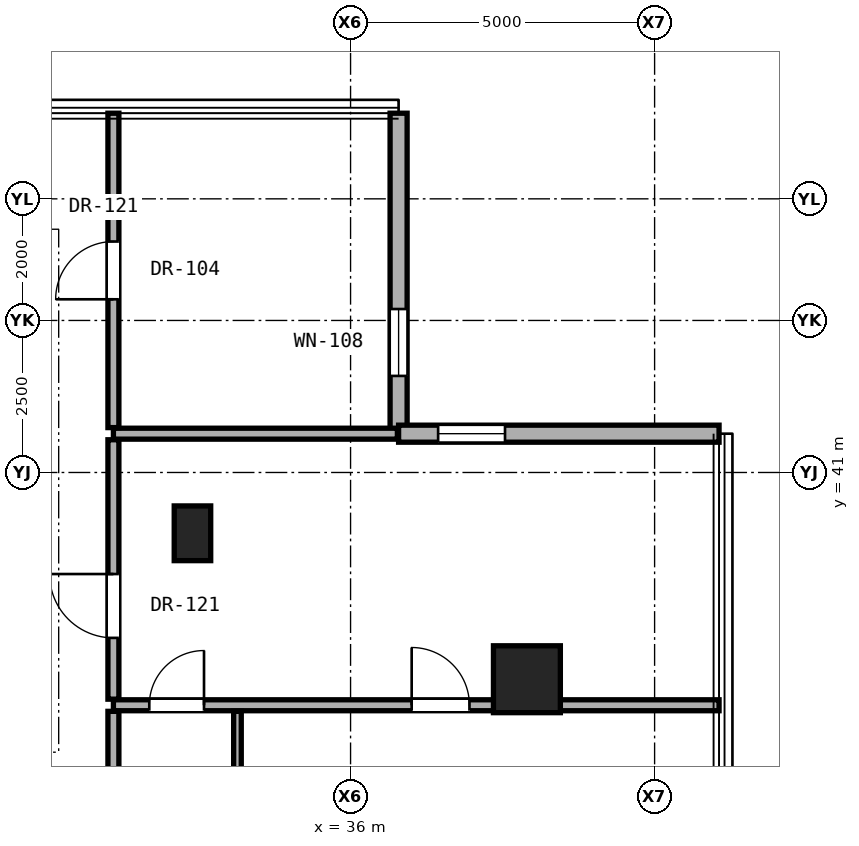
"""IFC4 building model, lengths in metres.
Left out: names, types, materials, properties, quantities, classifications, styles, units other than length and angle.
Written with IfcOpenShell. Run it as: python <this file> out.ifc"""

import sys

from ifc_helpers import new_model, si_unit, direction, frame, frame_2d, origin, origin_2d, place, context, subcontext, project, spatial, rectangle, hollow_rectangle, extrude, element, fill, save


model = new_model("IFC4")
c1 = context("Model", 3, precision=1e-05, world=origin(), true_north=direction((0.0, 1.0)))
c2 = subcontext(c1, "Body", "Model", "MODEL_VIEW")
j1 = project(units=[si_unit("LENGTHUNIT", "METRE"), si_unit("PLANEANGLEUNIT", "RADIAN")], contexts=[c1])
p1 = place(None, origin())
s1 = spatial("IfcSite", under=j1, at=p1, CompositionType="ELEMENT")
p2 = place(p1, origin())
s2 = spatial("IfcBuilding", under=s1, at=p2, CompositionType="ELEMENT")
p3 = place(p2, frame((0.0, 0.0, 137.9)))
s3 = spatial("IfcBuildingStorey", under=s2, at=p3, CompositionType="ELEMENT", Elevation=137.9)
p4 = place(p3, frame((38.9, 37.6, 0.0), z_axis=(0.0, 0.0, 1.0), x_axis=(1.0, 0.0, 0.0)))
e1 = element("IfcColumn", 1, at=p4, inside=s3, PredefinedType="COLUMN", context=c2, shape_type="SweptSolid", body=[
    extrude(hollow_rectangle(XDim=1.1, YDim=1.1, WallThickness=0.06, at=origin_2d()), origin(), (0.0, 0.0, 1.0), 3.3),
])
p5 = place(p3, frame((33.4, 40.0, 0.0), z_axis=(0.0, 0.0, 1.0), x_axis=(1.0, 0.0, 0.0)))
e2 = element("IfcColumn", 2, at=p5, inside=s3, PredefinedType="PILASTER", context=c2, shape_type="SweptSolid", body=[
    extrude(rectangle(XDim=0.6, YDim=0.9, at=origin_2d()), origin(), (0.0, 0.0, 1.0), 3.3),
])
p6 = place(p3, frame((36.79, 41.638, 0.0), z_axis=(0.0, 0.0, 1.0), x_axis=(0.0, 1.0, 0.0)))
e3 = element("IfcWall", 3, at=p6, inside=s3, PredefinedType="SOLIDWALL", context=c2, shape_type="SweptSolid", body=[
    extrude(rectangle(XDim=5.27, YDim=0.28, at=frame_2d((2.635, 0.0))), origin(), (0.0, 0.0, 1.0), 3.06),
])
p7 = place(p6, frame((0.95, 0.0, 0.85)))
e4 = element("IfcOpeningElement", 4, at=p7, cuts=e3, PredefinedType="OPENING", context=c2, shape_type="SweptSolid", body=[
    extrude(rectangle(XDim=1.1, YDim=2.0, at=frame_2d((0.55, 1.0))), frame((0.0, 0.15, 0.0), z_axis=(0.0, -1.0, 0.0), x_axis=(1.0, 0.0, 0.0)), (0.0, 0.0, 1.0), 0.3),
])
p8 = place(p3, frame((42.06, 41.638, 0.0), z_axis=(0.0, 0.0, 1.0), x_axis=(-1.0, 0.0, 0.0)))
e5 = element("IfcWall", 5, at=p8, inside=s3, PredefinedType="SOLIDWALL", context=c2, shape_type="SweptSolid", body=[
    extrude(rectangle(XDim=5.27, YDim=0.28, at=frame_2d((2.635, 0.0))), origin(), (0.0, 0.0, 1.0), 3.06),
])
p9 = place(p8, frame((3.52, 0.0, 0.85)))
e6 = element("IfcOpeningElement", 6, at=p9, cuts=e5, PredefinedType="OPENING", context=c2, shape_type="SweptSolid", body=[
    extrude(rectangle(XDim=1.1, YDim=2.0, at=frame_2d((0.55, 1.0))), frame((0.0, 0.15, 0.0), z_axis=(0.0, -1.0, 0.0), x_axis=(1.0, 0.0, 0.0)), (0.0, 0.0, 1.0), 0.3),
])
p10 = place(p3, frame((32.1, 37.172, 0.0), z_axis=(0.0, 0.0, 1.0), x_axis=(1.0, 0.0, 0.0)))
e7 = element("IfcWall", 7, at=p10, inside=s3, PredefinedType="PARTITIONING", context=c2, shape_type="SweptSolid", body=[
    extrude(rectangle(XDim=9.96, YDim=0.18, at=frame_2d((4.98, 0.0))), origin(), (0.0, 0.0, 1.0), 2.299),
])
p11 = place(p10, frame((4.905, 0.0, 0.0)))
e8 = element("IfcOpeningElement", 8, at=p11, cuts=e7, PredefinedType="OPENING", context=c2, shape_type="SweptSolid", body=[
    extrude(rectangle(XDim=0.95, YDim=2.15, at=frame_2d((0.475, 1.075))), frame((0.0, 0.1, 0.0), z_axis=(0.0, -1.0, 0.0), x_axis=(1.0, 0.0, 0.0)), (0.0, 0.0, 1.0), 0.2),
])
p12 = place(p10, frame((0.59, 0.0, 0.0)))
e9 = element("IfcOpeningElement", 9, at=p12, cuts=e7, PredefinedType="OPENING", context=c2, shape_type="SweptSolid", body=[
    extrude(rectangle(XDim=0.9, YDim=2.1, at=frame_2d((0.45, 1.05))), frame((0.0, 0.1, 0.0), z_axis=(0.0, -1.0, 0.0), x_axis=(1.0, 0.0, 0.0)), (0.0, 0.0, 1.0), 0.2),
])
p13 = place(p3, frame((32.1, 41.638, 0.0), z_axis=(0.0, 0.0, 1.0), x_axis=(1.0, 0.0, 0.0)))
e10 = element("IfcWall", 10, at=p13, inside=s3, PredefinedType="PARTITIONING", context=c2, shape_type="SweptSolid", body=[
    extrude(rectangle(XDim=4.67, YDim=0.18, at=frame_2d((2.335, 0.0))), origin(), (0.0, 0.0, 1.0), 3.08),
])
p14 = place(p3, frame((32.1, 34.524, 0.0), z_axis=(0.0, 0.0, 1.0), x_axis=(0.0, 1.0, 0.0)))
e11 = element("IfcWall", 11, at=p14, inside=s3, PredefinedType="PARTITIONING", context=c2, shape_type="SweptSolid", body=[
    extrude(rectangle(XDim=2.548, YDim=0.18, at=frame_2d((1.274, 0.0))), origin(), (0.0, 0.0, 1.0), 3.08),
])
p15 = place(p3, frame((32.1, 37.272, 0.0), z_axis=(0.0, 0.0, 1.0), x_axis=(0.0, 1.0, 0.0)))
e12 = element("IfcWall", 12, at=p15, inside=s3, PredefinedType="PARTITIONING", context=c2, shape_type="SweptSolid", body=[
    extrude(rectangle(XDim=4.266, YDim=0.18, at=frame_2d((2.133, 0.0))), origin(), (0.0, 0.0, 1.0), 2.456),
])
p16 = place(p15, frame((1.008, 0.0, 0.0)))
e13 = element("IfcOpeningElement", 13, at=p16, cuts=e12, PredefinedType="OPENING", context=c2, shape_type="SweptSolid", body=[
    extrude(rectangle(XDim=1.05, YDim=2.2, at=frame_2d((0.525, 1.1))), frame((0.0, 0.1, 0.0), z_axis=(0.0, -1.0, 0.0), x_axis=(1.0, 0.0, 0.0)), (0.0, 0.0, 1.0), 0.2),
])
p17 = place(p3, frame((32.1, 41.738, 0.0), z_axis=(0.0, 0.0, 1.0), x_axis=(0.0, 1.0, 0.0)))
e14 = element("IfcWall", 14, at=p17, inside=s3, PredefinedType="PARTITIONING", context=c2, shape_type="SweptSolid", body=[
    extrude(rectangle(XDim=5.17, YDim=0.18, at=frame_2d((2.585, 0.0))), origin(), (0.0, 0.0, 1.0), 3.08),
])
p18 = place(p17, frame((2.11, 0.0, 0.0)))
e15 = element("IfcOpeningElement", 15, at=p18, cuts=e14, PredefinedType="OPENING", context=c2, shape_type="SweptSolid", body=[
    extrude(rectangle(XDim=0.95, YDim=2.15, at=frame_2d((0.475, 1.075))), frame((0.0, 0.1, 0.0), z_axis=(0.0, -1.0, 0.0), x_axis=(1.0, 0.0, 0.0)), (0.0, 0.0, 1.0), 0.2),
])
p19 = place(p3, frame((34.14, 34.524, 0.0), z_axis=(0.0, 0.0, 1.0), x_axis=(0.0, 1.0, 0.0)))
e16 = element("IfcWall", 16, at=p19, inside=s3, PredefinedType="PARTITIONING", context=c2, shape_type="SweptSolid", body=[
    extrude(rectangle(XDim=2.548, YDim=0.125, at=frame_2d((1.274, 0.0))), origin(), (0.0, 0.0, 1.0), 3.08),
])
p20 = place(p7, origin())
e17 = element("IfcWindow", 17, at=p20, inside=s3, PartitioningType="SINGLE_PANEL", PredefinedType="WINDOW", context=c2, shape_type="SweptSolid", body=[
    extrude(rectangle(XDim=1.1, YDim=2.0, at=frame_2d((0.55, 1.0))), frame((0.0, 0.03, 0.0), z_axis=(0.0, -1.0, 0.0), x_axis=(1.0, 0.0, 0.0)), (0.0, 0.0, 1.0), 0.06),
])
fill(e4, e17)
p21 = place(p9, origin())
e18 = element("IfcWindow", 18, at=p21, inside=s3, PartitioningType="SINGLE_PANEL", PredefinedType="WINDOW", context=c2, shape_type="SweptSolid", body=[
    extrude(rectangle(XDim=1.1, YDim=2.0, at=frame_2d((0.55, 1.0))), frame((0.0, 0.03, 0.0), z_axis=(0.0, -1.0, 0.0), x_axis=(1.0, 0.0, 0.0)), (0.0, 0.0, 1.0), 0.06),
])
fill(e6, e18)
p22 = place(p16, origin())
e19 = element("IfcDoor", 19, at=p22, inside=s3, OperationType="SINGLE_SWING_RIGHT", PredefinedType="DOOR", context=c2, shape_type="SweptSolid", body=[
    extrude(rectangle(XDim=1.05, YDim=2.2, at=frame_2d((0.525, 1.1))), frame((0.0, 0.025, 0.0), z_axis=(0.0, -1.0, 0.0), x_axis=(1.0, 0.0, 0.0)), (0.0, 0.0, 1.0), 0.05),
])
fill(e13, e19)
p23 = place(p11, origin())
e20 = element("IfcDoor", 20, at=p23, inside=s3, OperationType="SINGLE_SWING_LEFT", PredefinedType="DOOR", context=c2, shape_type="SweptSolid", body=[
    extrude(rectangle(XDim=0.95, YDim=2.15, at=frame_2d((0.475, 1.075))), frame((0.0, 0.025, 0.0), z_axis=(0.0, -1.0, 0.0), x_axis=(1.0, 0.0, 0.0)), (0.0, 0.0, 1.0), 0.05),
])
fill(e8, e20)
p24 = place(p12, origin())
e21 = element("IfcDoor", 21, at=p24, inside=s3, OperationType="SINGLE_SWING_RIGHT", PredefinedType="DOOR", context=c2, shape_type="SweptSolid", body=[
    extrude(rectangle(XDim=0.9, YDim=2.1, at=frame_2d((0.45, 1.05))), frame((0.0, 0.025, 0.0), z_axis=(0.0, -1.0, 0.0), x_axis=(1.0, 0.0, 0.0)), (0.0, 0.0, 1.0), 0.05),
])
fill(e9, e21)
p25 = place(p18, origin())
e22 = element("IfcDoor", 22, at=p25, inside=s3, OperationType="SINGLE_SWING_LEFT", PredefinedType="DOOR", context=c2, shape_type="SweptSolid", body=[
    extrude(rectangle(XDim=0.95, YDim=2.15, at=frame_2d((0.475, 1.075))), frame((0.0, 0.025, 0.0), z_axis=(0.0, -1.0, 0.0), x_axis=(1.0, 0.0, 0.0)), (0.0, 0.0, 1.0), 0.05),
])
fill(e15, e22)
save(model, sys.argv[1])
